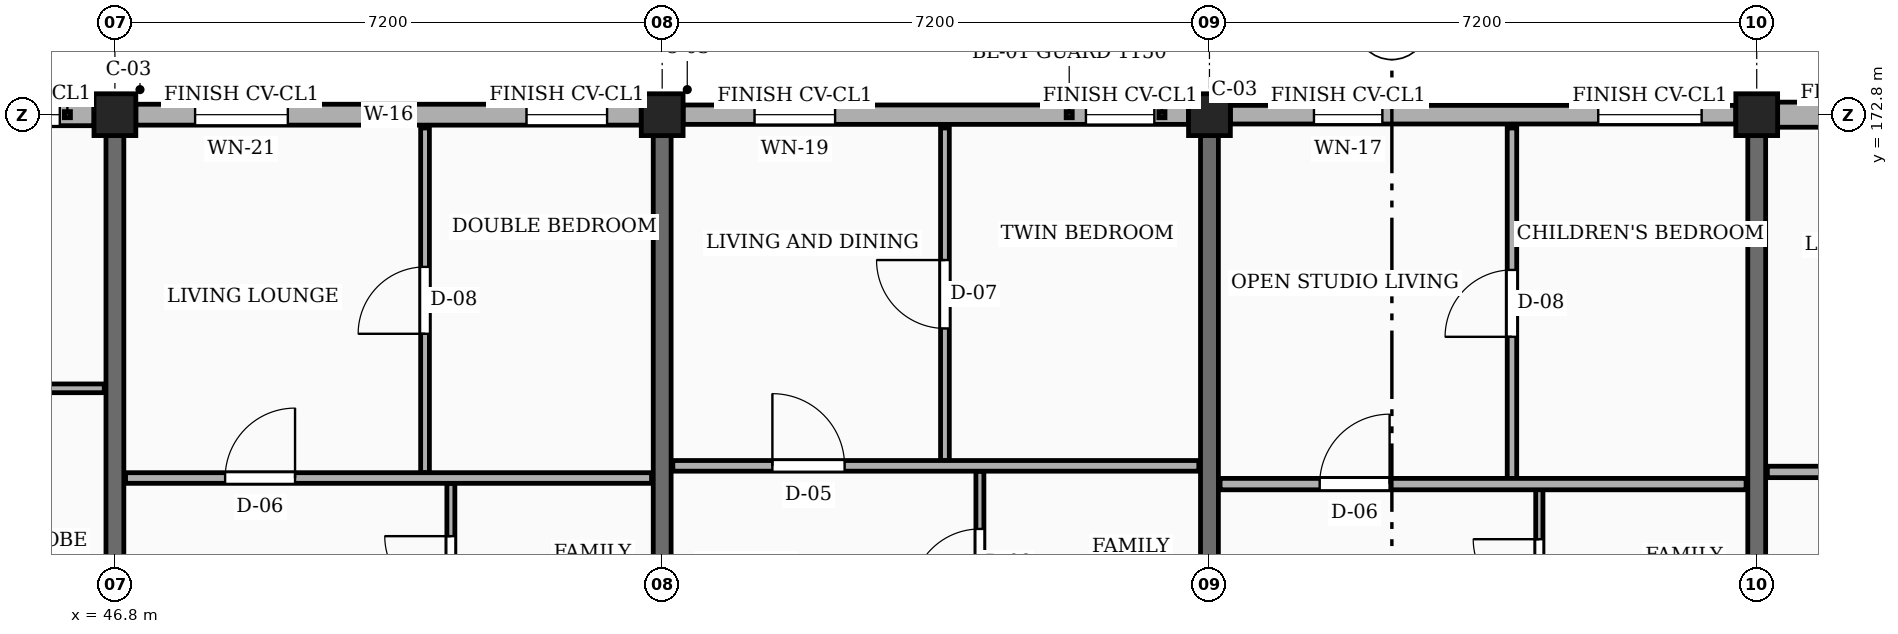
"""IFC4 building model, lengths in metres.
Left out: names, types, materials, properties, quantities, classifications, styles, units other than length and angle.
Written with IfcOpenShell. Run it as: python <this file> out.ifc"""

import sys

from ifc_helpers import new_model, si_unit, direction, frame, frame_2d, origin, origin_2d, place, context, subcontext, project, spatial, rectangle, extrude, element, fill, save


model = new_model("IFC4")
c1 = context("Model", 3, precision=1e-05, world=origin(), true_north=direction((0.0, 1.0)))
c2 = subcontext(c1, "Body", "Model", "MODEL_VIEW")
j1 = project(units=[si_unit("LENGTHUNIT", "METRE"), si_unit("PLANEANGLEUNIT", "RADIAN")], contexts=[c1])
p1 = place(None, origin())
s1 = spatial("IfcSite", under=j1, at=p1, CompositionType="ELEMENT")
p2 = place(p1, origin())
s2 = spatial("IfcBuilding", under=s1, at=p2, CompositionType="ELEMENT")
p3 = place(p2, frame((0.0, 0.0, 20.25)))
s3 = spatial("IfcBuildingStorey", under=s2, at=p3, CompositionType="ELEMENT", Elevation=20.25)
for number, where, z_axis, x_axis in (
    (1, (46.8, 172.8, 0.0), (0.0, 0.0, 1.0), (1.0, 0.0, 0.0)),
    (2, (54.0, 172.8, 0.0), (0.0, 0.0, 1.0), (1.0, 0.0, 0.0)),
    (3, (61.2, 172.8, 0.0), (0.0, 0.0, 1.0), (1.0, 0.0, 0.0)),
    (4, (68.4, 172.8, 0.0), (0.0, 0.0, 1.0), (1.0, 0.0, 0.0)),
):
    element("IfcColumn", number, at=place(p3, frame(where, z_axis=z_axis, x_axis=x_axis)), inside=s3, PredefinedType="COLUMN", context=c2, shape_type="SweptSolid", body=[
        extrude(rectangle(XDim=0.55, YDim=0.55, at=origin_2d()), origin(), (0.0, 0.0, 1.0), 3.15),
    ])
for number, where, z_axis, x_axis in (
    (5, (46.8, 165.925, 0.0), (0.0, 0.0, 1.0), (0.0, 1.0, 0.0)),
    (6, (54.0, 165.925, 0.0), (0.0, 0.0, 1.0), (0.0, 1.0, 0.0)),
    (7, (61.2, 165.925, 0.0), (0.0, 0.0, 1.0), (0.0, 1.0, 0.0)),
    (8, (68.4, 165.925, 0.0), (0.0, 0.0, 1.0), (0.0, 1.0, 0.0)),
):
    element("IfcWall", number, at=place(p3, frame(where, z_axis=z_axis, x_axis=x_axis)), inside=s3, PredefinedType="SOLIDWALL", context=c2, shape_type="SweptSolid", body=[
        extrude(rectangle(XDim=6.6, YDim=0.235, at=frame_2d((3.3, 0.0))), origin(), (0.0, 0.0, 1.0), 2.185),
    ])
p4 = place(p3, frame((75.325, 172.8, 0.0), z_axis=(0.0, 0.0, 1.0), x_axis=(-1.0, 0.0, 0.0)))
e9 = element("IfcWall", 9, at=p4, inside=s3, PredefinedType="SOLIDWALL", context=c2, shape_type="SweptSolid", body=[
    extrude(rectangle(XDim=6.65, YDim=0.33, at=frame_2d((3.325, 0.0))), origin(), (0.0, 0.0, 1.0), 2.455),
])
p5 = place(p4, frame((0.45, 0.0, 0.78)))
e10 = element("IfcOpeningElement", 10, at=p5, cuts=e9, PredefinedType="OPENING", context=c2, shape_type="SweptSolid", body=[
    extrude(rectangle(XDim=1.2, YDim=1.26, at=frame_2d((0.6, 0.63))), frame((0.0, 0.175, 0.0), z_axis=(0.0, -1.0, 0.0), x_axis=(1.0, 0.0, 0.0)), (0.0, 0.0, 1.0), 0.35),
])
p6 = place(p4, frame((4.65, 0.0, 0.78)))
e11 = element("IfcOpeningElement", 11, at=p6, cuts=e9, PredefinedType="OPENING", context=c2, shape_type="SweptSolid", body=[
    extrude(rectangle(XDim=1.36, YDim=1.26, at=frame_2d((0.68, 0.63))), frame((0.0, 0.175, 0.0), z_axis=(0.0, -1.0, 0.0), x_axis=(1.0, 0.0, 0.0)), (0.0, 0.0, 1.0), 0.35),
])
p7 = place(p3, frame((68.125, 172.8, 0.0), z_axis=(0.0, 0.0, 1.0), x_axis=(-1.0, 0.0, 0.0)))
e12 = element("IfcWall", 12, at=p7, inside=s3, PredefinedType="SOLIDWALL", context=c2, shape_type="SweptSolid", body=[
    extrude(rectangle(XDim=6.65, YDim=0.245, at=frame_2d((3.325, 0.0))), origin(), (0.0, 0.0, 1.0), 2.455),
])
p8 = place(p7, frame((0.45, 0.0, 0.78)))
e13 = element("IfcOpeningElement", 13, at=p8, cuts=e12, PredefinedType="OPENING", context=c2, shape_type="SweptSolid", body=[
    extrude(rectangle(XDim=1.36, YDim=1.26, at=frame_2d((0.68, 0.63))), frame((0.0, 0.133, 0.0), z_axis=(0.0, -1.0, 0.0), x_axis=(1.0, 0.0, 0.0)), (0.0, 0.0, 1.0), 0.265),
])
p9 = place(p7, frame((4.65, 0.0, 0.78)))
e14 = element("IfcOpeningElement", 14, at=p9, cuts=e12, PredefinedType="OPENING", context=c2, shape_type="SweptSolid", body=[
    extrude(rectangle(XDim=0.9, YDim=1.36, at=frame_2d((0.45, 0.68))), frame((0.0, 0.133, 0.0), z_axis=(0.0, -1.0, 0.0), x_axis=(1.0, 0.0, 0.0)), (0.0, 0.0, 1.0), 0.265),
])
p10 = place(p3, frame((60.925, 172.8, 0.0), z_axis=(0.0, 0.0, 1.0), x_axis=(-1.0, 0.0, 0.0)))
e15 = element("IfcWall", 15, at=p10, inside=s3, PredefinedType="SOLIDWALL", context=c2, shape_type="SweptSolid", body=[
    extrude(rectangle(XDim=6.65, YDim=0.255, at=frame_2d((3.325, 0.0))), origin(), (0.0, 0.0, 1.0), 2.455),
])
p11 = place(p10, frame((0.45, 0.0, 0.78)))
e16 = element("IfcOpeningElement", 16, at=p11, cuts=e15, PredefinedType="OPENING", context=c2, shape_type="SweptSolid", body=[
    extrude(rectangle(XDim=0.9, YDim=1.36, at=frame_2d((0.45, 0.68))), frame((0.0, 0.137, 0.0), z_axis=(0.0, -1.0, 0.0), x_axis=(1.0, 0.0, 0.0)), (0.0, 0.0, 1.0), 0.275),
])
p12 = place(p10, frame((4.65, 0.0, 0.78)))
e17 = element("IfcOpeningElement", 17, at=p12, cuts=e15, PredefinedType="OPENING", context=c2, shape_type="SweptSolid", body=[
    extrude(rectangle(XDim=1.06, YDim=1.36, at=frame_2d((0.53, 0.68))), frame((0.0, 0.137, 0.0), z_axis=(0.0, -1.0, 0.0), x_axis=(1.0, 0.0, 0.0)), (0.0, 0.0, 1.0), 0.275),
])
p13 = place(p3, frame((53.725, 172.8, 0.0), z_axis=(0.0, 0.0, 1.0), x_axis=(-1.0, 0.0, 0.0)))
e18 = element("IfcWall", 18, at=p13, inside=s3, PredefinedType="SOLIDWALL", context=c2, shape_type="SweptSolid", body=[
    extrude(rectangle(XDim=6.65, YDim=0.275, at=frame_2d((3.325, 0.0))), origin(), (0.0, 0.0, 1.0), 2.455),
])
p14 = place(p13, frame((0.45, 0.0, 0.78)))
e19 = element("IfcOpeningElement", 19, at=p14, cuts=e18, PredefinedType="OPENING", context=c2, shape_type="SweptSolid", body=[
    extrude(rectangle(XDim=1.06, YDim=1.36, at=frame_2d((0.53, 0.68))), frame((0.0, 0.147, 0.0), z_axis=(0.0, -1.0, 0.0), x_axis=(1.0, 0.0, 0.0)), (0.0, 0.0, 1.0), 0.295),
])
p15 = place(p13, frame((4.65, 0.0, 0.78)))
e20 = element("IfcOpeningElement", 20, at=p15, cuts=e18, PredefinedType="OPENING", context=c2, shape_type="SweptSolid", body=[
    extrude(rectangle(XDim=1.22, YDim=1.36, at=frame_2d((0.61, 0.68))), frame((0.0, 0.147, 0.0), z_axis=(0.0, -1.0, 0.0), x_axis=(1.0, 0.0, 0.0)), (0.0, 0.0, 1.0), 0.295),
])
p16 = place(p3, frame((46.525, 172.8, 0.0), z_axis=(0.0, 0.0, 1.0), x_axis=(-1.0, 0.0, 0.0)))
e21 = element("IfcWall", 21, at=p16, inside=s3, PredefinedType="SOLIDWALL", context=c2, shape_type="SweptSolid", body=[
    extrude(rectangle(XDim=6.65, YDim=0.29, at=frame_2d((3.325, 0.0))), origin(), (0.0, 0.0, 1.0), 2.455),
])
p17 = place(p16, frame((0.45, 0.0, 0.78)))
e22 = element("IfcOpeningElement", 22, at=p17, cuts=e21, PredefinedType="OPENING", context=c2, shape_type="SweptSolid", body=[
    extrude(rectangle(XDim=1.22, YDim=1.36, at=frame_2d((0.61, 0.68))), frame((0.0, 0.155, 0.0), z_axis=(0.0, -1.0, 0.0), x_axis=(1.0, 0.0, 0.0)), (0.0, 0.0, 1.0), 0.31),
])
p18 = place(p16, frame((4.65, 0.0, 0.78)))
e23 = element("IfcOpeningElement", 23, at=p18, cuts=e21, PredefinedType="OPENING", context=c2, shape_type="SweptSolid", body=[
    extrude(rectangle(XDim=1.38, YDim=1.36, at=frame_2d((0.69, 0.68))), frame((0.0, 0.155, 0.0), z_axis=(0.0, -1.0, 0.0), x_axis=(1.0, 0.0, 0.0)), (0.0, 0.0, 1.0), 0.31),
])
p19 = place(p3, frame((39.74, 169.2, 0.0), z_axis=(0.0, 0.0, 1.0), x_axis=(1.0, 0.0, 0.0)))
e24 = element("IfcWall", 24, at=p19, inside=s3, PredefinedType="PARTITIONING", context=c2, shape_type="SweptSolid", body=[
    extrude(rectangle(XDim=6.92, YDim=0.115, at=frame_2d((3.46, 0.0))), origin(), (0.0, 0.0, 1.0), 2.32),
])
p20 = place(p19, frame((1.05, 0.0, 0.0)))
e25 = element("IfcOpeningElement", 25, at=p20, cuts=e24, PredefinedType="OPENING", context=c2, shape_type="SweptSolid", body=[
    extrude(rectangle(XDim=0.87, YDim=2.05, at=frame_2d((0.435, 1.025))), frame((0.0, 0.067, 0.0), z_axis=(0.0, -1.0, 0.0), x_axis=(1.0, 0.0, 0.0)), (0.0, 0.0, 1.0), 0.135),
])
p21 = place(p19, frame((4.45, 0.0, 0.0)))
e26 = element("IfcOpeningElement", 26, at=p21, cuts=e24, PredefinedType="OPENING", context=c2, shape_type="SweptSolid", body=[
    extrude(rectangle(XDim=0.88, YDim=2.08, at=frame_2d((0.44, 1.04))), frame((0.0, 0.067, 0.0), z_axis=(0.0, -1.0, 0.0), x_axis=(1.0, 0.0, 0.0)), (0.0, 0.0, 1.0), 0.135),
])
p22 = place(p3, frame((50.88, 168.09, 0.0), z_axis=(0.0, 0.0, 1.0), x_axis=(0.0, 1.0, 0.0)))
e27 = element("IfcWall", 27, at=p22, inside=s3, PredefinedType="PARTITIONING", context=c2, shape_type="SweptSolid", body=[
    extrude(rectangle(XDim=4.535, YDim=0.115, at=frame_2d((2.268, 0.0))), origin(), (0.0, 0.0, 1.0), 2.32),
])
p23 = place(p22, frame((1.827, 0.0, 0.0)))
e28 = element("IfcOpeningElement", 28, at=p23, cuts=e27, PredefinedType="OPENING", context=c2, shape_type="SweptSolid", body=[
    extrude(rectangle(XDim=0.88, YDim=2.08, at=frame_2d((0.44, 1.04))), frame((0.0, 0.067, 0.0), z_axis=(0.0, -1.0, 0.0), x_axis=(1.0, 0.0, 0.0)), (0.0, 0.0, 1.0), 0.135),
])
p24 = place(p3, frame((51.22, 165.69, 0.0), z_axis=(0.0, 0.0, 1.0), x_axis=(0.0, 1.0, 0.0)))
e29 = element("IfcWall", 29, at=p24, inside=s3, PredefinedType="PARTITIONING", context=c2, shape_type="SweptSolid", body=[
    extrude(rectangle(XDim=2.26, YDim=0.105, at=frame_2d((1.13, 0.0))), origin(), (0.0, 0.0, 1.0), 2.32),
])
p25 = place(p24, frame((0.695, 0.0, 0.0)))
e30 = element("IfcOpeningElement", 30, at=p25, cuts=e29, PredefinedType="OPENING", context=c2, shape_type="SweptSolid", body=[
    extrude(rectangle(XDim=0.87, YDim=2.05, at=frame_2d((0.435, 1.025))), frame((0.0, 0.062, 0.0), z_axis=(0.0, -1.0, 0.0), x_axis=(1.0, 0.0, 0.0)), (0.0, 0.0, 1.0), 0.125),
])
p26 = place(p3, frame((46.94, 168.02, 0.0), z_axis=(0.0, 0.0, 1.0), x_axis=(1.0, 0.0, 0.0)))
e31 = element("IfcWall", 31, at=p26, inside=s3, PredefinedType="PARTITIONING", context=c2, shape_type="SweptSolid", body=[
    extrude(rectangle(XDim=6.92, YDim=0.14, at=frame_2d((3.46, 0.0))), origin(), (0.0, 0.0, 1.0), 2.32),
])
p27 = place(p26, frame((1.31, 0.0, 0.0)))
e32 = element("IfcOpeningElement", 32, at=p27, cuts=e31, PredefinedType="OPENING", context=c2, shape_type="SweptSolid", body=[
    extrude(rectangle(XDim=0.92, YDim=2.1, at=frame_2d((0.46, 1.05))), frame((0.0, 0.08, 0.0), z_axis=(0.0, -1.0, 0.0), x_axis=(1.0, 0.0, 0.0)), (0.0, 0.0, 1.0), 0.16),
])
p28 = place(p3, frame((57.72, 168.25, 0.0), z_axis=(0.0, 0.0, 1.0), x_axis=(0.0, 1.0, 0.0)))
e33 = element("IfcWall", 33, at=p28, inside=s3, PredefinedType="PARTITIONING", context=c2, shape_type="SweptSolid", body=[
    extrude(rectangle(XDim=4.375, YDim=0.115, at=frame_2d((2.188, 0.0))), origin(), (0.0, 0.0, 1.0), 2.32),
])
p29 = place(p28, frame((1.738, 0.0, 0.0)))
e34 = element("IfcOpeningElement", 34, at=p29, cuts=e33, PredefinedType="OPENING", context=c2, shape_type="SweptSolid", body=[
    extrude(rectangle(XDim=0.9, YDim=2.1, at=frame_2d((0.45, 1.05))), frame((0.0, 0.067, 0.0), z_axis=(0.0, -1.0, 0.0), x_axis=(1.0, 0.0, 0.0)), (0.0, 0.0, 1.0), 0.135),
])
p30 = place(p3, frame((58.18, 165.69, 0.0), z_axis=(0.0, 0.0, 1.0), x_axis=(0.0, 1.0, 0.0)))
e35 = element("IfcWall", 35, at=p30, inside=s3, PredefinedType="PARTITIONING", context=c2, shape_type="SweptSolid", body=[
    extrude(rectangle(XDim=2.42, YDim=0.105, at=frame_2d((1.21, 0.0))), origin(), (0.0, 0.0, 1.0), 2.32),
])
p31 = place(p30, frame((0.76, 0.0, 0.0)))
e36 = element("IfcOpeningElement", 36, at=p31, cuts=e35, PredefinedType="OPENING", context=c2, shape_type="SweptSolid", body=[
    extrude(rectangle(XDim=0.9, YDim=2.05, at=frame_2d((0.45, 1.025))), frame((0.0, 0.062, 0.0), z_axis=(0.0, -1.0, 0.0), x_axis=(1.0, 0.0, 0.0)), (0.0, 0.0, 1.0), 0.125),
])
p32 = place(p3, frame((54.14, 168.18, 0.0), z_axis=(0.0, 0.0, 1.0), x_axis=(1.0, 0.0, 0.0)))
e37 = element("IfcWall", 37, at=p32, inside=s3, PredefinedType="PARTITIONING", context=c2, shape_type="SweptSolid", body=[
    extrude(rectangle(XDim=6.92, YDim=0.14, at=frame_2d((3.46, 0.0))), origin(), (0.0, 0.0, 1.0), 2.32),
])
p33 = place(p32, frame((1.31, 0.0, 0.0)))
e38 = element("IfcOpeningElement", 38, at=p33, cuts=e37, PredefinedType="OPENING", context=c2, shape_type="SweptSolid", body=[
    extrude(rectangle(XDim=0.95, YDim=2.1, at=frame_2d((0.475, 1.05))), frame((0.0, 0.08, 0.0), z_axis=(0.0, -1.0, 0.0), x_axis=(1.0, 0.0, 0.0)), (0.0, 0.0, 1.0), 0.16),
])
p34 = place(p3, frame((65.18, 168.01, 0.0), z_axis=(0.0, 0.0, 1.0), x_axis=(0.0, 1.0, 0.0)))
e39 = element("IfcWall", 39, at=p34, inside=s3, PredefinedType="PARTITIONING", context=c2, shape_type="SweptSolid", body=[
    extrude(rectangle(XDim=4.615, YDim=0.125, at=frame_2d((2.308, 0.0))), origin(), (0.0, 0.0, 1.0), 2.32),
])
p35 = place(p34, frame((1.867, 0.0, 0.0)))
e40 = element("IfcOpeningElement", 40, at=p35, cuts=e39, PredefinedType="OPENING", context=c2, shape_type="SweptSolid", body=[
    extrude(rectangle(XDim=0.88, YDim=2.08, at=frame_2d((0.44, 1.04))), frame((0.0, 0.073, 0.0), z_axis=(0.0, -1.0, 0.0), x_axis=(1.0, 0.0, 0.0)), (0.0, 0.0, 1.0), 0.145),
])
p36 = place(p3, frame((65.54, 165.69, 0.0), z_axis=(0.0, 0.0, 1.0), x_axis=(0.0, 1.0, 0.0)))
e41 = element("IfcWall", 41, at=p36, inside=s3, PredefinedType="PARTITIONING", context=c2, shape_type="SweptSolid", body=[
    extrude(rectangle(XDim=2.18, YDim=0.095, at=frame_2d((1.09, 0.0))), origin(), (0.0, 0.0, 1.0), 2.32),
])
p37 = place(p36, frame((0.655, 0.0, 0.0)))
e42 = element("IfcOpeningElement", 42, at=p37, cuts=e41, PredefinedType="OPENING", context=c2, shape_type="SweptSolid", body=[
    extrude(rectangle(XDim=0.87, YDim=2.05, at=frame_2d((0.435, 1.025))), frame((0.0, 0.058, 0.0), z_axis=(0.0, -1.0, 0.0), x_axis=(1.0, 0.0, 0.0)), (0.0, 0.0, 1.0), 0.115),
])
p38 = place(p3, frame((61.34, 167.94, 0.0), z_axis=(0.0, 0.0, 1.0), x_axis=(1.0, 0.0, 0.0)))
e43 = element("IfcWall", 43, at=p38, inside=s3, PredefinedType="PARTITIONING", context=c2, shape_type="SweptSolid", body=[
    extrude(rectangle(XDim=6.92, YDim=0.15, at=frame_2d((3.46, 0.0))), origin(), (0.0, 0.0, 1.0), 2.32),
])
p39 = place(p38, frame((1.31, 0.0, 0.0)))
e44 = element("IfcOpeningElement", 44, at=p39, cuts=e43, PredefinedType="OPENING", context=c2, shape_type="SweptSolid", body=[
    extrude(rectangle(XDim=0.92, YDim=2.1, at=frame_2d((0.46, 1.05))), frame((0.0, 0.085, 0.0), z_axis=(0.0, -1.0, 0.0), x_axis=(1.0, 0.0, 0.0)), (0.0, 0.0, 1.0), 0.17),
])
p40 = place(p3, frame((68.54, 168.1, 0.0), z_axis=(0.0, 0.0, 1.0), x_axis=(1.0, 0.0, 0.0)))
e45 = element("IfcWall", 45, at=p40, inside=s3, PredefinedType="PARTITIONING", context=c2, shape_type="SweptSolid", body=[
    extrude(rectangle(XDim=6.885, YDim=0.15, at=frame_2d((3.442, 0.0))), origin(), (0.0, 0.0, 1.0), 2.32),
])
p41 = place(p40, frame((1.31, 0.0, 0.0)))
e46 = element("IfcOpeningElement", 46, at=p41, cuts=e45, PredefinedType="OPENING", context=c2, shape_type="SweptSolid", body=[
    extrude(rectangle(XDim=0.95, YDim=2.1, at=frame_2d((0.475, 1.05))), frame((0.0, 0.085, 0.0), z_axis=(0.0, -1.0, 0.0), x_axis=(1.0, 0.0, 0.0)), (0.0, 0.0, 1.0), 0.17),
])
p42 = place(p8, origin())
e47 = element("IfcWindow", 47, at=p42, inside=s3, PartitioningType="SINGLE_PANEL", PredefinedType="WINDOW", context=c2, shape_type="SweptSolid", body=[
    extrude(rectangle(XDim=1.36, YDim=1.26, at=frame_2d((0.68, 0.63))), frame((0.0, 0.03, 0.0), z_axis=(0.0, -1.0, 0.0), x_axis=(1.0, 0.0, 0.0)), (0.0, 0.0, 1.0), 0.06),
])
fill(e13, e47)
p43 = place(p9, origin())
e48 = element("IfcWindow", 48, at=p43, inside=s3, PartitioningType="SINGLE_PANEL", PredefinedType="WINDOW", context=c2, shape_type="SweptSolid", body=[
    extrude(rectangle(XDim=0.9, YDim=1.36, at=frame_2d((0.45, 0.68))), frame((0.0, 0.03, 0.0), z_axis=(0.0, -1.0, 0.0), x_axis=(1.0, 0.0, 0.0)), (0.0, 0.0, 1.0), 0.06),
])
fill(e14, e48)
p44 = place(p11, origin())
e49 = element("IfcWindow", 49, at=p44, inside=s3, PartitioningType="SINGLE_PANEL", PredefinedType="WINDOW", context=c2, shape_type="SweptSolid", body=[
    extrude(rectangle(XDim=0.9, YDim=1.36, at=frame_2d((0.45, 0.68))), frame((0.0, 0.03, 0.0), z_axis=(0.0, -1.0, 0.0), x_axis=(1.0, 0.0, 0.0)), (0.0, 0.0, 1.0), 0.06),
])
fill(e16, e49)
p45 = place(p12, origin())
e50 = element("IfcWindow", 50, at=p45, inside=s3, PartitioningType="SINGLE_PANEL", PredefinedType="WINDOW", context=c2, shape_type="SweptSolid", body=[
    extrude(rectangle(XDim=1.06, YDim=1.36, at=frame_2d((0.53, 0.68))), frame((0.0, 0.03, 0.0), z_axis=(0.0, -1.0, 0.0), x_axis=(1.0, 0.0, 0.0)), (0.0, 0.0, 1.0), 0.06),
])
fill(e17, e50)
p46 = place(p14, origin())
e51 = element("IfcWindow", 51, at=p46, inside=s3, PartitioningType="SINGLE_PANEL", PredefinedType="WINDOW", context=c2, shape_type="SweptSolid", body=[
    extrude(rectangle(XDim=1.06, YDim=1.36, at=frame_2d((0.53, 0.68))), frame((0.0, 0.03, 0.0), z_axis=(0.0, -1.0, 0.0), x_axis=(1.0, 0.0, 0.0)), (0.0, 0.0, 1.0), 0.06),
])
fill(e19, e51)
p47 = place(p15, origin())
e52 = element("IfcWindow", 52, at=p47, inside=s3, PartitioningType="SINGLE_PANEL", PredefinedType="WINDOW", context=c2, shape_type="SweptSolid", body=[
    extrude(rectangle(XDim=1.22, YDim=1.36, at=frame_2d((0.61, 0.68))), frame((0.0, 0.03, 0.0), z_axis=(0.0, -1.0, 0.0), x_axis=(1.0, 0.0, 0.0)), (0.0, 0.0, 1.0), 0.06),
])
fill(e20, e52)
p48 = place(p17, origin())
e53 = element("IfcWindow", 53, at=p48, inside=s3, PartitioningType="SINGLE_PANEL", PredefinedType="WINDOW", context=c2, shape_type="SweptSolid", body=[
    extrude(rectangle(XDim=1.22, YDim=1.36, at=frame_2d((0.61, 0.68))), frame((0.0, 0.03, 0.0), z_axis=(0.0, -1.0, 0.0), x_axis=(1.0, 0.0, 0.0)), (0.0, 0.0, 1.0), 0.06),
])
fill(e22, e53)
p49 = place(p23, origin())
e54 = element("IfcDoor", 54, at=p49, inside=s3, OperationType="SINGLE_SWING_LEFT", PredefinedType="DOOR", context=c2, shape_type="SweptSolid", body=[
    extrude(rectangle(XDim=0.88, YDim=2.08, at=frame_2d((0.44, 1.04))), frame((0.0, 0.025, 0.0), z_axis=(0.0, -1.0, 0.0), x_axis=(1.0, 0.0, 0.0)), (0.0, 0.0, 1.0), 0.05),
])
fill(e28, e54)
p50 = place(p25, origin())
e55 = element("IfcDoor", 55, at=p50, inside=s3, OperationType="SINGLE_SWING_RIGHT", PredefinedType="DOOR", context=c2, shape_type="SweptSolid", body=[
    extrude(rectangle(XDim=0.87, YDim=2.05, at=frame_2d((0.435, 1.025))), frame((0.0, 0.025, 0.0), z_axis=(0.0, -1.0, 0.0), x_axis=(1.0, 0.0, 0.0)), (0.0, 0.0, 1.0), 0.05),
])
fill(e30, e55)
p51 = place(p27, origin())
e56 = element("IfcDoor", 56, at=p51, inside=s3, OperationType="SINGLE_SWING_RIGHT", PredefinedType="DOOR", context=c2, shape_type="SweptSolid", body=[
    extrude(rectangle(XDim=0.92, YDim=2.1, at=frame_2d((0.46, 1.05))), frame((0.0, 0.025, 0.0), z_axis=(0.0, -1.0, 0.0), x_axis=(1.0, 0.0, 0.0)), (0.0, 0.0, 1.0), 0.05),
])
fill(e32, e56)
p52 = place(p29, origin())
e57 = element("IfcDoor", 57, at=p52, inside=s3, OperationType="SINGLE_SWING_RIGHT", PredefinedType="DOOR", context=c2, shape_type="SweptSolid", body=[
    extrude(rectangle(XDim=0.9, YDim=2.1, at=frame_2d((0.45, 1.05))), frame((0.0, 0.025, 0.0), z_axis=(0.0, -1.0, 0.0), x_axis=(1.0, 0.0, 0.0)), (0.0, 0.0, 1.0), 0.05),
])
fill(e34, e57)
p53 = place(p31, origin())
e58 = element("IfcDoor", 58, at=p53, inside=s3, OperationType="SINGLE_SWING_LEFT", PredefinedType="DOOR", context=c2, shape_type="SweptSolid", body=[
    extrude(rectangle(XDim=0.9, YDim=2.05, at=frame_2d((0.45, 1.025))), frame((0.0, 0.025, 0.0), z_axis=(0.0, -1.0, 0.0), x_axis=(1.0, 0.0, 0.0)), (0.0, 0.0, 1.0), 0.05),
])
fill(e36, e58)
p54 = place(p33, origin())
e59 = element("IfcDoor", 59, at=p54, inside=s3, OperationType="SINGLE_SWING_LEFT", PredefinedType="DOOR", context=c2, shape_type="SweptSolid", body=[
    extrude(rectangle(XDim=0.95, YDim=2.1, at=frame_2d((0.475, 1.05))), frame((0.0, 0.025, 0.0), z_axis=(0.0, -1.0, 0.0), x_axis=(1.0, 0.0, 0.0)), (0.0, 0.0, 1.0), 0.05),
])
fill(e38, e59)
p55 = place(p35, origin())
e60 = element("IfcDoor", 60, at=p55, inside=s3, OperationType="SINGLE_SWING_LEFT", PredefinedType="DOOR", context=c2, shape_type="SweptSolid", body=[
    extrude(rectangle(XDim=0.88, YDim=2.08, at=frame_2d((0.44, 1.04))), frame((0.0, 0.025, 0.0), z_axis=(0.0, -1.0, 0.0), x_axis=(1.0, 0.0, 0.0)), (0.0, 0.0, 1.0), 0.05),
])
fill(e40, e60)
p56 = place(p37, origin())
e61 = element("IfcDoor", 61, at=p56, inside=s3, OperationType="SINGLE_SWING_RIGHT", PredefinedType="DOOR", context=c2, shape_type="SweptSolid", body=[
    extrude(rectangle(XDim=0.87, YDim=2.05, at=frame_2d((0.435, 1.025))), frame((0.0, 0.025, 0.0), z_axis=(0.0, -1.0, 0.0), x_axis=(1.0, 0.0, 0.0)), (0.0, 0.0, 1.0), 0.05),
])
fill(e42, e61)
p57 = place(p39, origin())
e62 = element("IfcDoor", 62, at=p57, inside=s3, OperationType="SINGLE_SWING_RIGHT", PredefinedType="DOOR", context=c2, shape_type="SweptSolid", body=[
    extrude(rectangle(XDim=0.92, YDim=2.1, at=frame_2d((0.46, 1.05))), frame((0.0, 0.025, 0.0), z_axis=(0.0, -1.0, 0.0), x_axis=(1.0, 0.0, 0.0)), (0.0, 0.0, 1.0), 0.05),
])
fill(e44, e62)
save(model, sys.argv[1])
